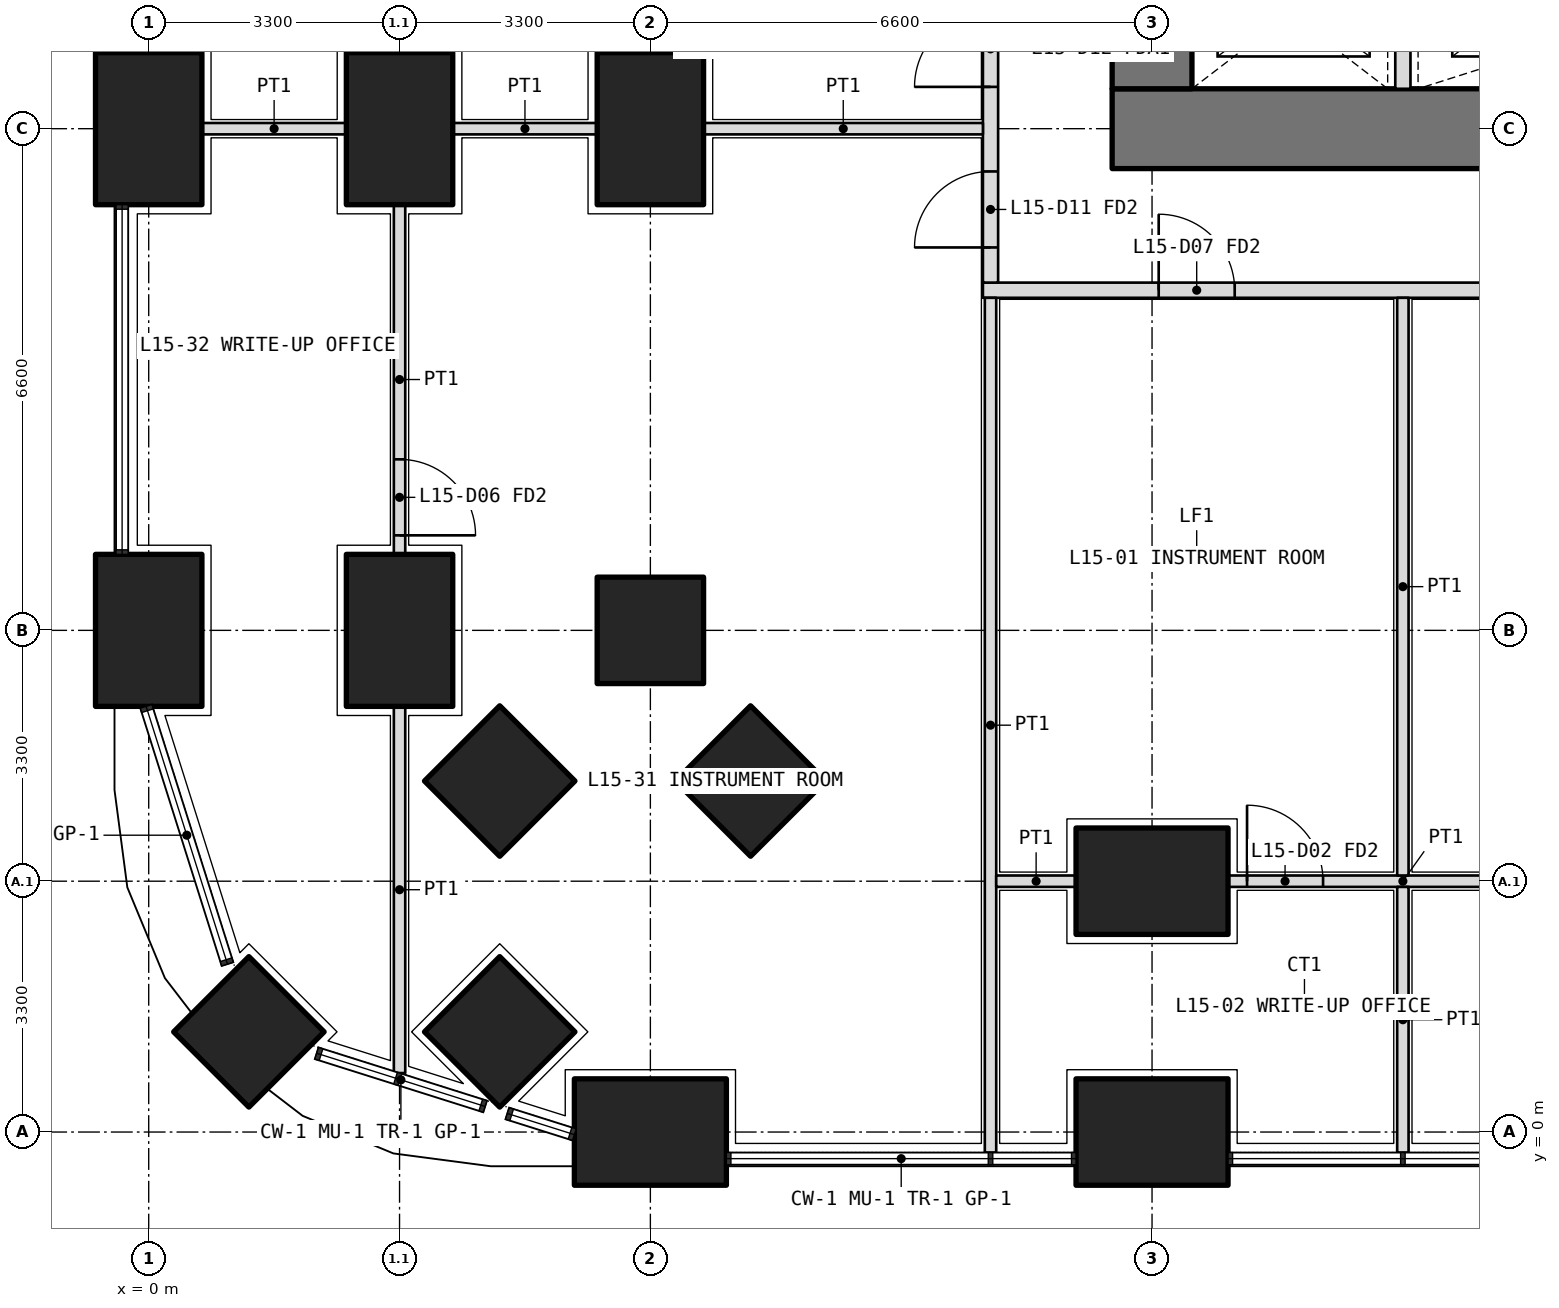
"""IFC4 building model, lengths in metres.
Left out: names, types, materials, properties, quantities, classifications, styles, units other than length and angle.
Written with IfcOpenShell. Run it as: python <this file> out.ifc"""

import sys

from ifc_helpers import new_model, si_unit, direction, frame, frame_2d, origin, origin_2d, place, context, subcontext, project, spatial, rectangle, extrude, element, fill, save


model = new_model("IFC4")
c1 = context("Model", 3, precision=1e-05, world=origin(), true_north=direction((0.0, 1.0)))
c2 = subcontext(c1, "Body", "Model", "MODEL_VIEW")
j1 = project(units=[si_unit("LENGTHUNIT", "METRE"), si_unit("PLANEANGLEUNIT", "RADIAN")], contexts=[c1])
p1 = place(None, origin())
s1 = spatial("IfcSite", under=j1, at=p1, CompositionType="ELEMENT")
p2 = place(p1, origin())
s2 = spatial("IfcBuilding", under=s1, at=p2, CompositionType="ELEMENT")
p3 = place(p2, frame((0.0, 0.0, 67.5)))
s3 = spatial("IfcBuildingStorey", under=s2, at=p3, CompositionType="ELEMENT", Elevation=67.5)
p4 = place(p3, frame((1.318, 1.318, 0.0), z_axis=(0.0, 0.0, 1.0), x_axis=(0.707106781187, 0.707106781187, 0.0)))
e1 = element("IfcColumn", 1, at=p4, inside=s3, PredefinedType="COLUMN", context=c2, shape_type="SweptSolid", body=[
    extrude(rectangle(XDim=1.4, YDim=1.4, at=origin_2d()), origin(), (0.0, 0.0, 1.0), 4.2),
])
for number, where, z_axis, x_axis in (
    (2, (6.6, 0.0, 0.0), (0.0, 0.0, 1.0), (1.0, 0.0, 0.0)),
    (3, (13.2, 0.0, 0.0), (0.0, 0.0, 1.0), (1.0, 0.0, 0.0)),
    (4, (0.0, 6.6, 0.0), (0.0, 0.0, 1.0), (0.0, 1.0, 0.0)),
    (5, (0.0, 13.2, 0.0), (0.0, 0.0, 1.0), (0.0, 1.0, 0.0)),
):
    element("IfcColumn", number, at=place(p3, frame(where, z_axis=z_axis, x_axis=x_axis)), inside=s3, PredefinedType="COLUMN", context=c2, shape_type="SweptSolid", body=[
        extrude(rectangle(XDim=2.0, YDim=1.4, at=origin_2d()), origin(), (0.0, 0.0, 1.0), 4.2),
    ])
for number, where, z_axis, x_axis in (
    (6, (6.6, 6.6, 0.0), (0.0, 0.0, 1.0), (1.0, 0.0, 0.0)),
    (7, (4.618, 1.318, 0.0), (0.0, 0.0, 1.0), (0.707, 0.707, 0.0)),
):
    element("IfcColumn", number, at=place(p3, frame(where, z_axis=z_axis, x_axis=x_axis)), inside=s3, PredefinedType="COLUMN", context=c2, shape_type="SweptSolid", body=[
        extrude(rectangle(XDim=1.4, YDim=1.4, at=origin_2d()), origin(), (0.0, 0.0, 1.0), 4.2),
    ])
for number, where, z_axis, x_axis in (
    (8, (3.3, 6.6, 0.0), (0.0, 0.0, 1.0), (0.0, 1.0, 0.0)),
    (9, (3.3, 13.2, 0.0), (0.0, 0.0, 1.0), (0.0, 1.0, 0.0)),
):
    element("IfcColumn", number, at=place(p3, frame(where, z_axis=z_axis, x_axis=x_axis)), inside=s3, PredefinedType="COLUMN", context=c2, shape_type="SweptSolid", body=[
        extrude(rectangle(XDim=2.0, YDim=1.4, at=origin_2d()), origin(), (0.0, 0.0, 1.0), 4.2),
    ])
p5 = place(p3, frame((4.618, 4.618, 0.0), z_axis=(0.0, 0.0, 1.0), x_axis=(0.707106781187, 0.707106781187, 0.0)))
e10 = element("IfcColumn", 10, at=p5, inside=s3, PredefinedType="COLUMN", context=c2, shape_type="SweptSolid", body=[
    extrude(rectangle(XDim=1.4, YDim=1.4, at=origin_2d()), origin(), (0.0, 0.0, 1.0), 4.2),
])
p6 = place(p3, frame((13.2, 3.3, 0.0), z_axis=(0.0, 0.0, 1.0), x_axis=(1.0, 0.0, 0.0)))
e11 = element("IfcColumn", 11, at=p6, inside=s3, PredefinedType="COLUMN", context=c2, shape_type="SweptSolid", body=[
    extrude(rectangle(XDim=2.0, YDim=1.4, at=origin_2d()), origin(), (0.0, 0.0, 1.0), 4.2),
])
p7 = place(p3, frame((7.918, 4.618, 0.0), z_axis=(0.0, 0.0, 1.0), x_axis=(0.707106781187, 0.707106781187, 0.0)))
e12 = element("IfcColumn", 12, at=p7, inside=s3, PredefinedType="COLUMN", context=c2, shape_type="SweptSolid", body=[
    extrude(rectangle(XDim=1.4, YDim=1.4, at=origin_2d()), origin(), (0.0, 0.0, 1.0), 4.2),
])
p8 = place(p3, frame((6.6, 13.2, 0.0), z_axis=(0.0, 0.0, 1.0), x_axis=(0.0, 1.0, 0.0)))
e13 = element("IfcColumn", 13, at=p8, inside=s3, PredefinedType="COLUMN", context=c2, shape_type="SweptSolid", body=[
    extrude(rectangle(XDim=2.0, YDim=1.4, at=origin_2d()), origin(), (0.0, 0.0, 1.0), 4.2),
])
p9 = place(p3, frame((12.675, 13.2, 0.0), z_axis=(0.0, 0.0, 1.0), x_axis=(1.0, 0.0, 0.0)))
e14 = element("IfcWall", 14, at=p9, inside=s3, PredefinedType="SHEAR", context=c2, shape_type="SweptSolid", body=[
    extrude(rectangle(XDim=27.45, YDim=1.05, at=frame_2d((13.725, 0.0))), origin(), (0.0, 0.0, 1.0), 4.2),
])
p10 = place(p3, frame((13.2, 32.475, 0.0), z_axis=(0.0, 0.0, 1.0), x_axis=(0.0, -1.0, 0.0)))
e15 = element("IfcWall", 15, at=p10, inside=s3, PredefinedType="SHEAR", context=c2, shape_type="SweptSolid", body=[
    extrude(rectangle(XDim=18.75, YDim=1.05, at=frame_2d((9.375, 0.0))), origin(), (0.0, 0.0, 1.0), 4.2),
])
p11 = place(p10, frame((14.125, 0.0, 0.0)))
e16 = element("IfcOpeningElement", 16, at=p11, cuts=e15, PredefinedType="OPENING", context=c2, shape_type="SweptSolid", body=[
    extrude(rectangle(XDim=1.6, YDim=2.1, at=frame_2d((0.8, 1.05))), frame((0.0, 0.535, 0.0), z_axis=(0.0, -1.0, 0.0), x_axis=(1.0, 0.0, 0.0)), (0.0, 0.0, 1.0), 1.07),
])
p12 = place(p10, frame((3.325, 0.0, 0.0)))
e17 = element("IfcOpeningElement", 17, at=p12, cuts=e15, PredefinedType="OPENING", context=c2, shape_type="SweptSolid", body=[
    extrude(rectangle(XDim=1.6, YDim=2.1, at=frame_2d((0.8, 1.05))), frame((0.0, 0.535, 0.0), z_axis=(0.0, -1.0, 0.0), x_axis=(1.0, 0.0, 0.0)), (0.0, 0.0, 1.0), 1.07),
])
p13 = place(p3, frame((16.5, 13.725, 0.0), z_axis=(0.0, 0.0, 1.0), x_axis=(0.0, 1.0, 0.0)))
e18 = element("IfcWall", 18, at=p13, inside=s3, PredefinedType="PARTITIONING", context=c2, shape_type="SweptSolid", body=[
    extrude(rectangle(XDim=1.975, YDim=0.2, at=frame_2d((0.987, 0.0))), origin(), (0.0, 0.0, 1.0), 4.2),
])
p14 = place(p3, frame((10.975, 11.075, 0.0), z_axis=(0.0, 0.0, 1.0), x_axis=(1.0, 0.0, 0.0)))
e19 = element("IfcWall", 19, at=p14, inside=s3, PredefinedType="PARTITIONING", context=c2, shape_type="SweptSolid", body=[
    extrude(rectangle(XDim=30.85, YDim=0.2, at=frame_2d((15.425, 0.0))), origin(), (0.0, 0.0, 1.0), 2.85),
])
p15 = place(p14, frame((2.312, 0.0, 0.0)))
e20 = element("IfcOpeningElement", 20, at=p15, cuts=e19, PredefinedType="OPENING", context=c2, shape_type="SweptSolid", body=[
    extrude(rectangle(XDim=1.0, YDim=2.1, at=frame_2d((0.5, 1.05))), frame((0.0, 0.11, 0.0), z_axis=(0.0, -1.0, 0.0), x_axis=(1.0, 0.0, 0.0)), (0.0, 0.0, 1.0), 0.22),
])
p16 = place(p14, frame((11.625, 0.0, 0.0)))
e21 = element("IfcOpeningElement", 21, at=p16, cuts=e19, PredefinedType="OPENING", context=c2, shape_type="SweptSolid", body=[
    extrude(rectangle(XDim=1.0, YDim=2.1, at=frame_2d((0.5, 1.05))), frame((0.0, 0.11, 0.0), z_axis=(0.0, -1.0, 0.0), x_axis=(1.0, 0.0, 0.0)), (0.0, 0.0, 1.0), 0.22),
])
p17 = place(p14, frame((23.075, 0.0, 0.0)))
e22 = element("IfcOpeningElement", 22, at=p17, cuts=e19, PredefinedType="OPENING", context=c2, shape_type="SweptSolid", body=[
    extrude(rectangle(XDim=1.2, YDim=2.1, at=frame_2d((0.6, 1.05))), frame((0.0, 0.11, 0.0), z_axis=(0.0, -1.0, 0.0), x_axis=(1.0, 0.0, 0.0)), (0.0, 0.0, 1.0), 0.22),
])
p18 = place(p14, frame((29.188, 0.0, 0.0)))
e23 = element("IfcOpeningElement", 23, at=p18, cuts=e19, PredefinedType="OPENING", context=c2, shape_type="SweptSolid", body=[
    extrude(rectangle(XDim=1.0, YDim=2.1, at=frame_2d((0.5, 1.05))), frame((0.0, 0.11, 0.0), z_axis=(0.0, -1.0, 0.0), x_axis=(1.0, 0.0, 0.0)), (0.0, 0.0, 1.0), 0.22),
])
p19 = place(p3, frame((11.075, 11.175, 0.0), z_axis=(0.0, 0.0, 1.0), x_axis=(0.0, 1.0, 0.0)))
e24 = element("IfcWall", 24, at=p19, inside=s3, PredefinedType="PARTITIONING", context=c2, shape_type="SweptSolid", body=[
    extrude(rectangle(XDim=23.85, YDim=0.2, at=frame_2d((11.925, 0.0))), origin(), (0.0, 0.0, 1.0), 2.85),
])
p20 = place(p19, frame((0.462, 0.0, 0.0)))
e25 = element("IfcOpeningElement", 25, at=p20, cuts=e24, PredefinedType="OPENING", context=c2, shape_type="SweptSolid", body=[
    extrude(rectangle(XDim=1.0, YDim=2.1, at=frame_2d((0.5, 1.05))), frame((0.0, 0.11, 0.0), z_axis=(0.0, -1.0, 0.0), x_axis=(1.0, 0.0, 0.0)), (0.0, 0.0, 1.0), 0.22),
])
p21 = place(p19, frame((2.575, 0.0, 0.0)))
e26 = element("IfcOpeningElement", 26, at=p21, cuts=e24, PredefinedType="OPENING", context=c2, shape_type="SweptSolid", body=[
    extrude(rectangle(XDim=1.0, YDim=2.1, at=frame_2d((0.5, 1.05))), frame((0.0, 0.11, 0.0), z_axis=(0.0, -1.0, 0.0), x_axis=(1.0, 0.0, 0.0)), (0.0, 0.0, 1.0), 0.22),
])
p22 = place(p19, frame((5.65, 0.0, 0.0)))
e27 = element("IfcOpeningElement", 27, at=p22, cuts=e24, PredefinedType="OPENING", context=c2, shape_type="SweptSolid", body=[
    extrude(rectangle(XDim=0.9, YDim=2.1, at=frame_2d((0.45, 1.05))), frame((0.0, 0.11, 0.0), z_axis=(0.0, -1.0, 0.0), x_axis=(1.0, 0.0, 0.0)), (0.0, 0.0, 1.0), 0.22),
])
p23 = place(p19, frame((9.5, 0.0, 0.0)))
e28 = element("IfcOpeningElement", 28, at=p23, cuts=e24, PredefinedType="OPENING", context=c2, shape_type="SweptSolid", body=[
    extrude(rectangle(XDim=0.9, YDim=2.1, at=frame_2d((0.45, 1.05))), frame((0.0, 0.11, 0.0), z_axis=(0.0, -1.0, 0.0), x_axis=(1.0, 0.0, 0.0)), (0.0, 0.0, 1.0), 0.22),
])
p24 = place(p19, frame((13.025, 0.0, 0.0)))
e29 = element("IfcOpeningElement", 29, at=p24, cuts=e24, PredefinedType="OPENING", context=c2, shape_type="SweptSolid", body=[
    extrude(rectangle(XDim=1.0, YDim=2.1, at=frame_2d((0.5, 1.05))), frame((0.0, 0.11, 0.0), z_axis=(0.0, -1.0, 0.0), x_axis=(1.0, 0.0, 0.0)), (0.0, 0.0, 1.0), 0.22),
])
p25 = place(p19, frame((18.025, 0.0, 0.0)))
e30 = element("IfcOpeningElement", 30, at=p25, cuts=e24, PredefinedType="OPENING", context=c2, shape_type="SweptSolid", body=[
    extrude(rectangle(XDim=1.0, YDim=2.1, at=frame_2d((0.5, 1.05))), frame((0.0, 0.11, 0.0), z_axis=(0.0, -1.0, 0.0), x_axis=(1.0, 0.0, 0.0)), (0.0, 0.0, 1.0), 0.22),
])
p26 = place(p19, frame((22.387, 0.0, 0.0)))
e31 = element("IfcOpeningElement", 31, at=p26, cuts=e24, PredefinedType="OPENING", context=c2, shape_type="SweptSolid", body=[
    extrude(rectangle(XDim=1.0, YDim=2.1, at=frame_2d((0.5, 1.05))), frame((0.0, 0.11, 0.0), z_axis=(0.0, -1.0, 0.0), x_axis=(1.0, 0.0, 0.0)), (0.0, 0.0, 1.0), 0.22),
])
p27 = place(p3, frame((11.075, -0.27, 0.0), z_axis=(0.0, 0.0, 1.0), x_axis=(0.0, 1.0, 0.0)))
e32 = element("IfcWall", 32, at=p27, inside=s3, PredefinedType="PARTITIONING", context=c2, shape_type="SweptSolid", body=[
    extrude(rectangle(XDim=11.245, YDim=0.15, at=frame_2d((5.623, 0.0))), origin(), (0.0, 0.0, 1.0), 2.6),
])
p28 = place(p3, frame((11.15, 3.3, 0.0), z_axis=(0.0, 0.0, 1.0), x_axis=(1.0, 0.0, 0.0)))
e33 = element("IfcWall", 33, at=p28, inside=s3, PredefinedType="PARTITIONING", context=c2, shape_type="SweptSolid", body=[
    extrude(rectangle(XDim=1.05, YDim=0.15, at=frame_2d((0.525, 0.0))), origin(), (0.0, 0.0, 1.0), 3.9),
])
p29 = place(p3, frame((14.2, 3.3, 0.0), z_axis=(0.0, 0.0, 1.0), x_axis=(1.0, 0.0, 0.0)))
e34 = element("IfcWall", 34, at=p29, inside=s3, PredefinedType="PARTITIONING", context=c2, shape_type="SweptSolid", body=[
    extrude(rectangle(XDim=4.6, YDim=0.15, at=frame_2d((2.3, 0.0))), origin(), (0.0, 0.0, 1.0), 3.9),
])
p30 = place(p29, frame((0.25, 0.0, 0.0)))
e35 = element("IfcOpeningElement", 35, at=p30, cuts=e34, PredefinedType="OPENING", context=c2, shape_type="SweptSolid", body=[
    extrude(rectangle(XDim=1.0, YDim=2.1, at=frame_2d((0.5, 1.05))), frame((0.0, 0.085, 0.0), z_axis=(0.0, -1.0, 0.0), x_axis=(1.0, 0.0, 0.0)), (0.0, 0.0, 1.0), 0.17),
])
p31 = place(p3, frame((16.5, -0.27, 0.0), z_axis=(0.0, 0.0, 1.0), x_axis=(0.0, 1.0, 0.0)))
e36 = element("IfcWall", 36, at=p31, inside=s3, PredefinedType="PARTITIONING", context=c2, shape_type="SweptSolid", body=[
    extrude(rectangle(XDim=3.495, YDim=0.15, at=frame_2d((1.748, 0.0))), origin(), (0.0, 0.0, 1.0), 2.6),
])
p32 = place(p3, frame((16.5, 3.375, 0.0), z_axis=(0.0, 0.0, 1.0), x_axis=(0.0, 1.0, 0.0)))
e37 = element("IfcWall", 37, at=p32, inside=s3, PredefinedType="PARTITIONING", context=c2, shape_type="SweptSolid", body=[
    extrude(rectangle(XDim=7.6, YDim=0.15, at=frame_2d((3.8, 0.0))), origin(), (0.0, 0.0, 1.0), 3.9),
])
p33 = place(p3, frame((3.3, 12.2, 0.0), z_axis=(0.0, 0.0, 1.0), x_axis=(0.0, -1.0, 0.0)))
e38 = element("IfcWall", 38, at=p33, inside=s3, PredefinedType="PARTITIONING", context=c2, shape_type="SweptSolid", body=[
    extrude(rectangle(XDim=4.6, YDim=0.15, at=frame_2d((2.3, 0.0))), origin(), (0.0, 0.0, 1.0), 3.9),
])
p34 = place(p33, frame((3.35, 0.0, 0.0)))
e39 = element("IfcOpeningElement", 39, at=p34, cuts=e38, PredefinedType="OPENING", context=c2, shape_type="SweptSolid", body=[
    extrude(rectangle(XDim=1.0, YDim=2.1, at=frame_2d((0.5, 1.05))), frame((0.0, 0.085, 0.0), z_axis=(0.0, -1.0, 0.0), x_axis=(1.0, 0.0, 0.0)), (0.0, 0.0, 1.0), 0.17),
])
p35 = place(p3, frame((3.3, 5.6, 0.0), z_axis=(0.0, 0.0, 1.0), x_axis=(0.0, -1.0, 0.0)))
e40 = element("IfcWall", 40, at=p35, inside=s3, PredefinedType="PARTITIONING", context=c2, shape_type="SweptSolid", body=[
    extrude(rectangle(XDim=4.824, YDim=0.15, at=frame_2d((2.412, 0.0))), origin(), (0.0, 0.0, 1.0), 2.6),
])
p36 = place(p3, frame((0.7, 13.2, 0.0), z_axis=(0.0, 0.0, 1.0), x_axis=(1.0, 0.0, 0.0)))
e41 = element("IfcWall", 41, at=p36, inside=s3, PredefinedType="PARTITIONING", context=c2, shape_type="SweptSolid", body=[
    extrude(rectangle(XDim=1.9, YDim=0.15, at=frame_2d((0.95, 0.0))), origin(), (0.0, 0.0, 1.0), 2.85),
])
p37 = place(p3, frame((4.0, 13.2, 0.0), z_axis=(0.0, 0.0, 1.0), x_axis=(1.0, 0.0, 0.0)))
e42 = element("IfcWall", 42, at=p37, inside=s3, PredefinedType="PARTITIONING", context=c2, shape_type="SweptSolid", body=[
    extrude(rectangle(XDim=1.9, YDim=0.15, at=frame_2d((0.95, 0.0))), origin(), (0.0, 0.0, 1.0), 2.85),
])
p38 = place(p3, frame((7.3, 13.2, 0.0), z_axis=(0.0, 0.0, 1.0), x_axis=(1.0, 0.0, 0.0)))
e43 = element("IfcWall", 43, at=p38, inside=s3, PredefinedType="PARTITIONING", context=c2, shape_type="SweptSolid", body=[
    extrude(rectangle(XDim=3.675, YDim=0.15, at=frame_2d((1.837, 0.0))), origin(), (0.0, 0.0, 1.0), 2.85),
])
p39 = place(p15, origin())
e44 = element("IfcDoor", 44, at=p39, inside=s3, OperationType="SINGLE_SWING_LEFT", PredefinedType="DOOR", context=c2, shape_type="SweptSolid", body=[
    extrude(rectangle(XDim=1.0, YDim=2.1, at=frame_2d((0.5, 1.05))), frame((0.0, 0.025, 0.0), z_axis=(0.0, -1.0, 0.0), x_axis=(1.0, 0.0, 0.0)), (0.0, 0.0, 1.0), 0.05),
])
fill(e20, e44)
p40 = place(p30, origin())
e45 = element("IfcDoor", 45, at=p40, inside=s3, OperationType="SINGLE_SWING_LEFT", PredefinedType="DOOR", context=c2, shape_type="SweptSolid", body=[
    extrude(rectangle(XDim=1.0, YDim=2.1, at=frame_2d((0.5, 1.05))), frame((0.0, 0.025, 0.0), z_axis=(0.0, -1.0, 0.0), x_axis=(1.0, 0.0, 0.0)), (0.0, 0.0, 1.0), 0.05),
])
fill(e35, e45)
p41 = place(p20, origin())
e46 = element("IfcDoor", 46, at=p41, inside=s3, OperationType="SINGLE_SWING_LEFT", PredefinedType="DOOR", context=c2, shape_type="SweptSolid", body=[
    extrude(rectangle(XDim=1.0, YDim=2.1, at=frame_2d((0.5, 1.05))), frame((0.0, 0.025, 0.0), z_axis=(0.0, -1.0, 0.0), x_axis=(1.0, 0.0, 0.0)), (0.0, 0.0, 1.0), 0.05),
])
fill(e25, e46)
p42 = place(p34, origin())
e47 = element("IfcDoor", 47, at=p42, inside=s3, OperationType="SINGLE_SWING_RIGHT", PredefinedType="DOOR", context=c2, shape_type="SweptSolid", body=[
    extrude(rectangle(XDim=1.0, YDim=2.1, at=frame_2d((0.5, 1.05))), frame((0.0, 0.025, 0.0), z_axis=(0.0, -1.0, 0.0), x_axis=(1.0, 0.0, 0.0)), (0.0, 0.0, 1.0), 0.05),
])
fill(e39, e47)
p43 = place(p21, origin())
e48 = element("IfcDoor", 48, at=p43, inside=s3, OperationType="SINGLE_SWING_LEFT", PredefinedType="DOOR", context=c2, shape_type="SweptSolid", body=[
    extrude(rectangle(XDim=1.0, YDim=2.1, at=frame_2d((0.5, 1.05))), frame((0.0, 0.025, 0.0), z_axis=(0.0, -1.0, 0.0), x_axis=(1.0, 0.0, 0.0)), (0.0, 0.0, 1.0), 0.05),
])
fill(e26, e48)
save(model, sys.argv[1])
